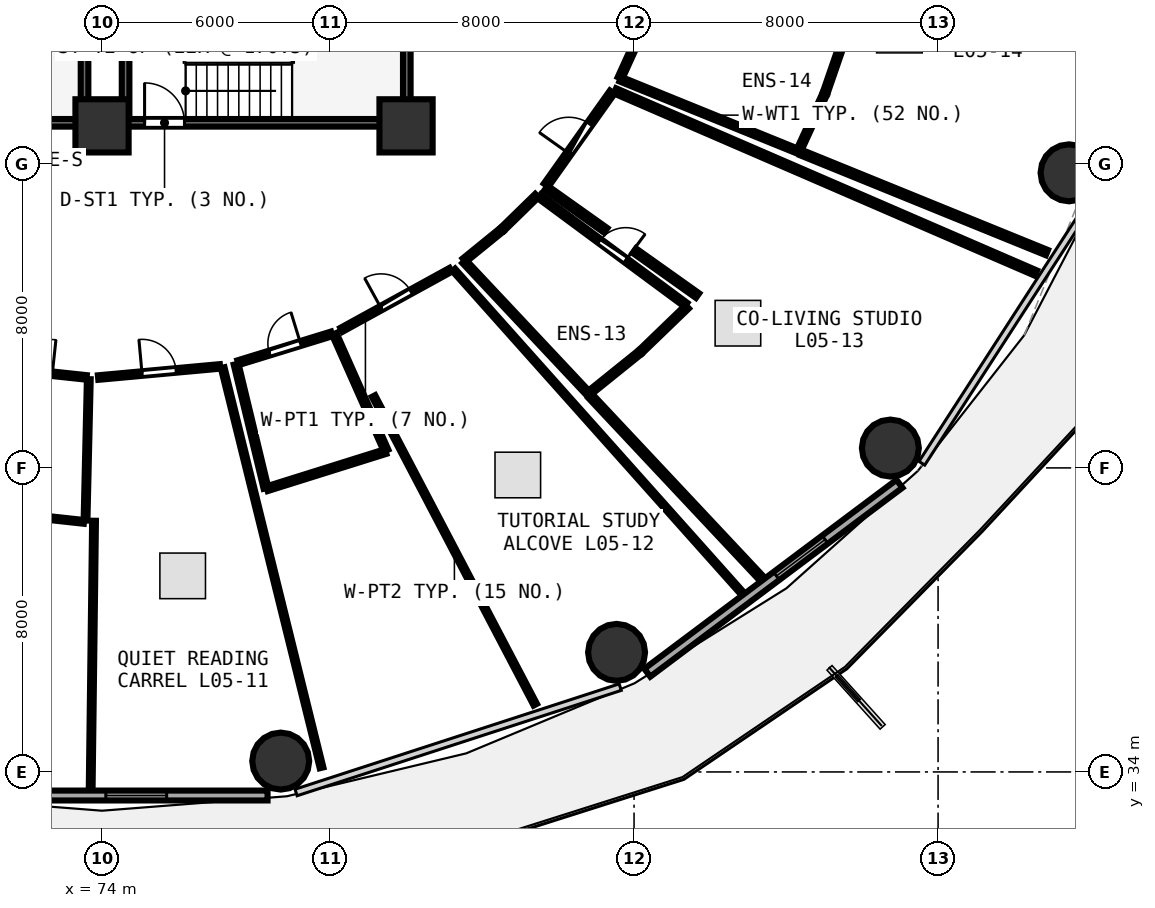
"""IFC4 building model, lengths in metres.
Left out: names, types, materials, properties, quantities, classifications, styles, units other than length and angle.
Written with IfcOpenShell. Run it as: python <this file> out.ifc"""

import sys

from ifc_helpers import new_model, si_unit, direction, frame, frame_2d, origin, origin_2d, place, context, subcontext, project, spatial, rectangle, circle, extrude, element, fill, save


model = new_model("IFC4")
c1 = context("Model", 3, precision=1e-05, world=origin(), true_north=direction((0.0, 1.0)))
c2 = subcontext(c1, "Body", "Model", "MODEL_VIEW")
j1 = project(units=[si_unit("LENGTHUNIT", "METRE"), si_unit("PLANEANGLEUNIT", "RADIAN")], contexts=[c1])
p1 = place(None, origin())
s1 = spatial("IfcSite", under=j1, at=p1, CompositionType="ELEMENT")
p2 = place(p1, origin())
s2 = spatial("IfcBuilding", under=s1, at=p2, CompositionType="ELEMENT")
p3 = place(p2, frame((0.0, 0.0, 22.5)))
s3 = spatial("IfcBuildingStorey", under=s2, at=p3, CompositionType="ELEMENT", Elevation=22.5)
for number, where, z_axis, x_axis in (
    (1, (74.0, 51.0, 0.0), (0.0, 0.0, 1.0), (1.0, 0.0, 0.0)),
    (2, (82.0, 51.0, 0.0), (0.0, 0.0, 1.0), (1.0, 0.0, 0.0)),
):
    element("IfcColumn", number, at=place(p3, frame(where, z_axis=z_axis, x_axis=x_axis)), inside=s3, PredefinedType="PILASTER", context=c2, shape_type="SweptSolid", body=[
        extrude(rectangle(XDim=1.4, YDim=1.4, at=origin_2d()), origin(), (0.0, 0.0, 1.0), 3.75),
    ])
for number, where, z_axis, x_axis in (
    (3, (78.702, 34.286, 0.0), (0.0, 0.0, 1.0), (1.0, 0.0, 0.0)),
    (4, (87.54, 37.146, 0.0), (0.0, 0.0, 1.0), (1.0, 0.0, 0.0)),
    (5, (94.744, 42.522, 0.0), (0.0, 0.0, 1.0), (1.0, 0.0, 0.0)),
    (6, (99.447, 49.764, 0.0), (0.0, 0.0, 1.0), (1.0, 0.0, 0.0)),
):
    element("IfcColumn", number, at=place(p3, frame(where, z_axis=z_axis, x_axis=x_axis)), inside=s3, PredefinedType="COLUMN", context=c2, shape_type="SweptSolid", body=[
        extrude(circle(Radius=0.75, at=origin_2d()), origin(), (0.0, 0.0, 1.0), 3.75),
    ])
p4 = place(p3, frame((69.644, 33.38, 0.0), z_axis=(0.0, 0.0, 1.0), x_axis=(1.0, 0.0, 0.0)))
e7 = element("IfcWall", 7, at=p4, inside=s3, PredefinedType="SOLIDWALL", context=c2, shape_type="SweptSolid", body=[
    extrude(rectangle(XDim=8.712, YDim=0.26, at=frame_2d((4.356, 0.0))), origin(), (0.0, 0.0, 1.0), 3.475),
])
p5 = place(p4, frame((4.456, 0.0, 0.85)))
e8 = element("IfcOpeningElement", 8, at=p5, cuts=e7, PredefinedType="OPENING", context=c2, shape_type="SweptSolid", body=[
    extrude(rectangle(XDim=1.6, YDim=1.45, at=frame_2d((0.8, 0.725))), frame((0.0, 0.14, 0.0), z_axis=(0.0, -1.0, 0.0), x_axis=(1.0, 0.0, 0.0)), (0.0, 0.0, 1.0), 0.28),
])
p6 = place(p3, frame((88.349, 36.611, 0.0), z_axis=(0.0, 0.0, 1.0), x_axis=(0.80030733173, 0.599590005569, 0.0)))
e9 = element("IfcWall", 9, at=p6, inside=s3, PredefinedType="SOLIDWALL", context=c2, shape_type="SweptSolid", body=[
    extrude(rectangle(XDim=8.291, YDim=0.26, at=frame_2d((4.145, 0.0))), origin(), (0.0, 0.0, 1.0), 3.475),
])
p7 = place(p6, frame((4.245, 0.0, 0.85)))
e10 = element("IfcOpeningElement", 10, at=p7, cuts=e9, PredefinedType="OPENING", context=c2, shape_type="SweptSolid", body=[
    extrude(rectangle(XDim=1.6, YDim=1.45, at=frame_2d((0.8, 0.725))), frame((0.0, 0.14, 0.0), z_axis=(0.0, -1.0, 0.0), x_axis=(1.0, 0.0, 0.0)), (0.0, 0.0, 1.0), 0.28),
])
p8 = place(p3, frame((74.0, 51.08, 0.0), z_axis=(0.0, 0.0, 1.0), x_axis=(1.0, 0.0, 0.0)))
e11 = element("IfcWall", 11, at=p8, inside=s3, PredefinedType="SHEAR", context=c2, shape_type="SweptSolid", body=[
    extrude(rectangle(XDim=7.9, YDim=0.2, at=frame_2d((3.95, 0.0))), origin(), (0.0, 0.0, 1.0), 3.49),
])
p9 = place(p8, frame((1.12, 0.0, 0.0)))
e12 = element("IfcOpeningElement", 12, at=p9, cuts=e11, PredefinedType="OPENING", context=c2, shape_type="SweptSolid", body=[
    extrude(rectangle(XDim=1.05, YDim=2.1, at=frame_2d((0.525, 1.05))), frame((0.0, 0.11, 0.0), z_axis=(0.0, -1.0, 0.0), x_axis=(1.0, 0.0, 0.0)), (0.0, 0.0, 1.0), 0.22),
])
for number, where, z_axis, x_axis in (
    (13, (82.02, 51.2, 0.0), (0.0, 0.0, 1.0), (0.0, 1.0, 0.0)),
    (14, (74.62, 54.27, 0.0), (0.0, 0.0, 1.0), (0.0, -1.0, 0.0)),
):
    element("IfcWall", number, at=place(p3, frame(where, z_axis=z_axis, x_axis=x_axis)), inside=s3, PredefinedType="SHEAR", context=c2, shape_type="SweptSolid", body=[
        extrude(rectangle(XDim=3.07, YDim=0.2, at=frame_2d((1.535, 0.0))), origin(), (0.0, 0.0, 1.0), 3.49),
    ])
p10 = place(p3, frame((66.26, 51.08, 0.0), z_axis=(0.0, 0.0, 1.0), x_axis=(1.0, 0.0, 0.0)))
e15 = element("IfcWall", 15, at=p10, inside=s3, PredefinedType="SHEAR", context=c2, shape_type="SweptSolid", body=[
    extrude(rectangle(XDim=7.16, YDim=0.2, at=frame_2d((3.58, 0.0))), origin(), (0.0, 0.0, 1.0), 3.49),
])
p11 = place(p3, frame((73.54, 51.2, 0.0), z_axis=(0.0, 0.0, 1.0), x_axis=(0.0, 1.0, 0.0)))
e16 = element("IfcWall", 16, at=p11, inside=s3, PredefinedType="SHEAR", context=c2, shape_type="SweptSolid", body=[
    extrude(rectangle(XDim=3.07, YDim=0.2, at=frame_2d((1.535, 0.0))), origin(), (0.0, 0.0, 1.0), 3.49),
])
p12 = place(p3, frame((70.895, 44.67, 0.0), z_axis=(0.0, 0.0, 1.0), x_axis=(0.994302004983, -0.106599825921, 0.0)))
e17 = element("IfcWall", 17, at=p12, inside=s3, PredefinedType="PARTITIONING", context=c2, shape_type="SweptSolid", body=[
    extrude(rectangle(XDim=2.714, YDim=0.12, at=frame_2d((1.357, 0.0))), origin(), (0.0, 0.0, 1.0), 3.235),
])
p13 = place(p12, frame((0.907, 0.0, 0.0)))
e18 = element("IfcOpeningElement", 18, at=p13, cuts=e17, PredefinedType="OPENING", context=c2, shape_type="SweptSolid", body=[
    extrude(rectangle(XDim=0.9, YDim=2.08, at=frame_2d((0.45, 1.04))), frame((0.0, 0.07, 0.0), z_axis=(0.0, -1.0, 0.0), x_axis=(1.0, 0.0, 0.0)), (0.0, 0.0, 1.0), 0.14),
])
p14 = place(p3, frame((73.897, 44.376, 0.0), z_axis=(0.0, 0.0, 1.0), x_axis=(0.995829610124, 0.091232601628, 0.0)))
e19 = element("IfcWall", 19, at=p14, inside=s3, PredefinedType="PARTITIONING", context=c2, shape_type="SweptSolid", body=[
    extrude(rectangle(XDim=3.222, YDim=0.12, at=frame_2d((1.611, 0.0))), origin(), (0.0, 0.0, 1.0), 3.235),
])
p15 = place(p14, frame((1.161, 0.0, 0.0)))
e20 = element("IfcOpeningElement", 20, at=p15, cuts=e19, PredefinedType="OPENING", context=c2, shape_type="SweptSolid", body=[
    extrude(rectangle(XDim=0.9, YDim=2.08, at=frame_2d((0.45, 1.04))), frame((0.0, 0.07, 0.0), z_axis=(0.0, -1.0, 0.0), x_axis=(1.0, 0.0, 0.0)), (0.0, 0.0, 1.0), 0.14),
])
p16 = place(p3, frame((77.58, 44.768, 0.0), z_axis=(0.0, 0.0, 1.0), x_axis=(0.955754448098, 0.294165659011, 0.0)))
e21 = element("IfcWall", 21, at=p16, inside=s3, PredefinedType="PLUMBINGWALL", context=c2, shape_type="SweptSolid", body=[
    extrude(rectangle(XDim=2.579, YDim=0.13, at=frame_2d((1.29, 0.0))), origin(), (0.0, 0.0, 1.0), 3.235),
])
p17 = place(p16, frame((0.86, 0.0, 0.0)))
e22 = element("IfcOpeningElement", 22, at=p17, cuts=e21, PredefinedType="OPENING", context=c2, shape_type="SweptSolid", body=[
    extrude(rectangle(XDim=0.86, YDim=2.05, at=frame_2d((0.43, 1.025))), frame((0.0, 0.075, 0.0), z_axis=(0.0, -1.0, 0.0), x_axis=(1.0, 0.0, 0.0)), (0.0, 0.0, 1.0), 0.15),
])
p18 = place(p3, frame((80.299, 45.632, 0.0), z_axis=(0.0, 0.0, 1.0), x_axis=(0.876387079092, 0.481607399861, 0.0)))
e23 = element("IfcWall", 23, at=p18, inside=s3, PredefinedType="PARTITIONING", context=c2, shape_type="SweptSolid", body=[
    extrude(rectangle(XDim=3.281, YDim=0.12, at=frame_2d((1.641, 0.0))), origin(), (0.0, 0.0, 1.0), 2.875),
])
p19 = place(p18, frame((1.191, 0.0, 0.0)))
e24 = element("IfcOpeningElement", 24, at=p19, cuts=e23, PredefinedType="OPENING", context=c2, shape_type="SweptSolid", body=[
    extrude(rectangle(XDim=0.9, YDim=2.08, at=frame_2d((0.45, 1.04))), frame((0.0, 0.07, 0.0), z_axis=(0.0, -1.0, 0.0), x_axis=(1.0, 0.0, 0.0)), (0.0, 0.0, 1.0), 0.14),
])
p20 = place(p3, frame((85.506, 49.143, 0.0), z_axis=(0.0, 0.0, 1.0), x_axis=(0.80412644244, -0.594458295063, 0.0)))
e25 = element("IfcWall", 25, at=p20, inside=s3, PredefinedType="PLUMBINGWALL", context=c2, shape_type="SweptSolid", body=[
    extrude(rectangle(XDim=4.799, YDim=0.13, at=frame_2d((2.399, 0.0))), origin(), (0.0, 0.0, 1.0), 2.875),
])
p21 = place(p20, frame((1.969, 0.0, 0.0)))
e26 = element("IfcOpeningElement", 26, at=p21, cuts=e25, PredefinedType="OPENING", context=c2, shape_type="SweptSolid", body=[
    extrude(rectangle(XDim=0.86, YDim=2.05, at=frame_2d((0.43, 1.025))), frame((0.0, 0.075, 0.0), z_axis=(0.0, -1.0, 0.0), x_axis=(1.0, 0.0, 0.0)), (0.0, 0.0, 1.0), 0.15),
])
p22 = place(p3, frame((85.686, 49.438, 0.0), z_axis=(0.0, 0.0, 1.0), x_axis=(0.579107689823, 0.815251055557, 0.0)))
e27 = element("IfcWall", 27, at=p22, inside=s3, PredefinedType="PARTITIONING", context=c2, shape_type="SweptSolid", body=[
    extrude(rectangle(XDim=3.005, YDim=0.15, at=frame_2d((1.503, 0.0))), origin(), (0.0, 0.0, 1.0), 2.875),
])
p23 = place(p22, frame((1.028, 0.0, 0.0)))
e28 = element("IfcOpeningElement", 28, at=p23, cuts=e27, PredefinedType="OPENING", context=c2, shape_type="SweptSolid", body=[
    extrude(rectangle(XDim=0.95, YDim=2.08, at=frame_2d((0.475, 1.04))), frame((0.0, 0.085, 0.0), z_axis=(0.0, -1.0, 0.0), x_axis=(1.0, 0.0, 0.0)), (0.0, 0.0, 1.0), 0.17),
])
p24 = place(p3, frame((73.652, 44.334, 0.0), z_axis=(0.0, 0.0, 1.0), x_axis=(-0.02316715399, -0.99973160547, 0.0)))
e29 = element("IfcWall", 29, at=p24, inside=s3, PredefinedType="PARTITIONING", context=c2, shape_type="SweptSolid", body=[
    extrude(rectangle(XDim=3.72, YDim=0.1, at=frame_2d((1.86, 0.0))), origin(), (0.0, 0.0, 1.0), 3.175),
])
p25 = place(p3, frame((73.525, 40.579, 0.0), z_axis=(0.0, 0.0, 1.0), x_axis=(-0.994070147468, 0.108740709544, 0.0)))
e30 = element("IfcWall", 30, at=p25, inside=s3, PredefinedType="PARTITIONING", context=c2, shape_type="SweptSolid", body=[
    extrude(rectangle(XDim=3.471, YDim=0.1, at=frame_2d((1.735, 0.0))), origin(), (0.0, 0.0, 1.0), 3.175),
])
p26 = place(p3, frame((77.175, 44.637, 0.0), z_axis=(0.0, 0.0, 1.0), x_axis=(0.239971369295, -0.970779965759, 0.0)))
e31 = element("IfcWall", 31, at=p26, inside=s3, PredefinedType="PARTITIONING", context=c2, shape_type="SweptSolid", body=[
    extrude(rectangle(XDim=10.846, YDim=0.1, at=frame_2d((5.423, 0.0))), origin(), (0.0, 0.0, 1.0), 2.875),
])
p27 = place(p3, frame((73.701, 33.561, 0.0), z_axis=(0.0, 0.0, 1.0), x_axis=(0.012537113793, 0.9999214073, 0.0)))
e32 = element("IfcWall", 32, at=p27, inside=s3, PredefinedType="PARTITIONING", context=c2, shape_type="SweptSolid", body=[
    extrude(rectangle(XDim=7.049, YDim=0.1, at=frame_2d((3.525, 0.0))), origin(), (0.0, 0.0, 1.0), 2.875),
])
p28 = place(p3, frame((80.111, 45.526, 0.0), z_axis=(0.0, 0.0, 1.0), x_axis=(0.405936178007, -0.913901427608, 0.0)))
e33 = element("IfcWall", 33, at=p28, inside=s3, PredefinedType="PLUMBINGWALL", context=c2, shape_type="SweptSolid", body=[
    extrude(rectangle(XDim=3.36, YDim=0.13, at=frame_2d((1.68, 0.0))), origin(), (0.0, 0.0, 1.0), 2.875),
])
p29 = place(p3, frame((81.464, 42.431, 0.0), z_axis=(0.0, 0.0, 1.0), x_axis=(-0.954175708416, -0.299246917226, 0.0)))
e34 = element("IfcWall", 34, at=p29, inside=s3, PredefinedType="PLUMBINGWALL", context=c2, shape_type="SweptSolid", body=[
    extrude(rectangle(XDim=3.275, YDim=0.13, at=frame_2d((1.637, 0.0))), origin(), (0.0, 0.0, 1.0), 2.875),
])
p30 = place(p3, frame((78.315, 41.464, 0.0), z_axis=(0.0, 0.0, 1.0), x_axis=(-0.234406131581, 0.972138758345, 0.0)))
e35 = element("IfcWall", 35, at=p30, inside=s3, PredefinedType="PLUMBINGWALL", context=c2, shape_type="SweptSolid", body=[
    extrude(rectangle(XDim=3.36, YDim=0.13, at=frame_2d((1.68, 0.0))), origin(), (0.0, 0.0, 1.0), 3.235),
])
p31 = place(p3, frame((83.254, 47.211, 0.0), z_axis=(0.0, 0.0, 1.0), x_axis=(0.66580890104, -0.746122313897, 0.0)))
e36 = element("IfcWall", 36, at=p31, inside=s3, PredefinedType="PARTITIONING", context=c2, shape_type="SweptSolid", body=[
    extrude(rectangle(XDim=11.399, YDim=0.1, at=frame_2d((5.7, 0.0))), origin(), (0.0, 0.0, 1.0), 2.875),
])
p32 = place(p3, frame((85.401, 35.769, 0.0), z_axis=(0.0, 0.0, 1.0), x_axis=(-0.464308397246, 0.885673592384, 0.0)))
e37 = element("IfcWall", 37, at=p32, inside=s3, PredefinedType="PARTITIONING", context=c2, shape_type="SweptSolid", body=[
    extrude(rectangle(XDim=9.17, YDim=0.1, at=frame_2d((4.585, 0.0))), origin(), (0.0, 0.0, 1.0), 2.875),
])
p33 = place(p3, frame((83.53, 47.461, 0.0), z_axis=(0.0, 0.0, 1.0), x_axis=(0.77596084644, 0.63078107517, 0.0)))
e38 = element("IfcWall", 38, at=p33, inside=s3, PredefinedType="PLUMBINGWALL", context=c2, shape_type="SweptSolid", body=[
    extrude(rectangle(XDim=1.268, YDim=0.13, at=frame_2d((0.634, 0.0))), origin(), (0.0, 0.0, 1.0), 2.875),
])
p34 = place(p3, frame((84.543, 48.287, 0.0), z_axis=(0.0, 0.0, 1.0), x_axis=(0.715980731769, 0.698120041064, 0.0)))
e39 = element("IfcWall", 39, at=p34, inside=s3, PredefinedType="PLUMBINGWALL", context=c2, shape_type="SweptSolid", body=[
    extrude(rectangle(XDim=1.258, YDim=0.13, at=frame_2d((0.629, 0.0))), origin(), (0.0, 0.0, 1.0), 2.875),
])
p35 = place(p3, frame((89.399, 46.241, 0.0), z_axis=(0.0, 0.0, 1.0), x_axis=(-0.719664402118, -0.694322078234, 0.0)))
e40 = element("IfcWall", 40, at=p35, inside=s3, PredefinedType="PLUMBINGWALL", context=c2, shape_type="SweptSolid", body=[
    extrude(rectangle(XDim=1.696, YDim=0.13, at=frame_2d((0.848, 0.0))), origin(), (0.0, 0.0, 1.0), 2.875),
])
p36 = place(p3, frame((88.148, 45.038, 0.0), z_axis=(0.0, 0.0, 1.0), x_axis=(-0.778806140639, -0.627264693174, 0.0)))
e41 = element("IfcWall", 41, at=p36, inside=s3, PredefinedType="PLUMBINGWALL", context=c2, shape_type="SweptSolid", body=[
    extrude(rectangle(XDim=1.713, YDim=0.13, at=frame_2d((0.856, 0.0))), origin(), (0.0, 0.0, 1.0), 3.175),
])
p37 = place(p3, frame((86.785, 43.966, 0.0), z_axis=(0.0, 0.0, 1.0), x_axis=(-0.68469858897, 0.728826345753, 0.0)))
e42 = element("IfcWall", 42, at=p37, inside=s3, PredefinedType="PLUMBINGWALL", context=c2, shape_type="SweptSolid", body=[
    extrude(rectangle(XDim=4.758, YDim=0.13, at=frame_2d((2.379, 0.0))), origin(), (0.0, 0.0, 1.0), 2.875),
])
p38 = place(p3, frame((87.498, 51.921, 0.0), z_axis=(0.0, 0.0, 1.0), x_axis=(0.917695041134, -0.397285554077, 0.0)))
e43 = element("IfcWall", 43, at=p38, inside=s3, PredefinedType="PARTITIONING", context=c2, shape_type="SweptSolid", body=[
    extrude(rectangle(XDim=12.07, YDim=0.15, at=frame_2d((6.035, 0.0))), origin(), (0.0, 0.0, 1.0), 2.875),
])
p39 = place(p3, frame((91.368, 39.078, 0.0), z_axis=(0.0, 0.0, 1.0), x_axis=(-0.684296653493, 0.729203736975, 0.0)))
e44 = element("IfcWall", 44, at=p39, inside=s3, PredefinedType="PARTITIONING", context=c2, shape_type="SweptSolid", body=[
    extrude(rectangle(XDim=6.6, YDim=0.15, at=frame_2d((3.3, 0.0))), origin(), (0.0, 0.0, 1.0), 2.875),
])
p40 = place(p3, frame((89.671, 46.533, 0.0), z_axis=(0.0, 0.0, 1.0), x_axis=(-0.815281399299, 0.579064970411, 0.0)))
e45 = element("IfcWall", 45, at=p40, inside=s3, PredefinedType="PARTITIONING", context=c2, shape_type="SweptSolid", body=[
    extrude(rectangle(XDim=2.042, YDim=0.15, at=frame_2d((1.021, 0.0))), origin(), (0.0, 0.0, 1.0), 3.48),
])
p41 = place(p3, frame((87.256, 48.249, 0.0), z_axis=(0.0, 0.0, 1.0), x_axis=(-0.815270043711, 0.579080957922, 0.0)))
e46 = element("IfcWall", 46, at=p41, inside=s3, PredefinedType="PARTITIONING", context=c2, shape_type="SweptSolid", body=[
    extrude(rectangle(XDim=1.929, YDim=0.15, at=frame_2d((0.964, 0.0))), origin(), (0.0, 0.0, 1.0), 3.235),
])
p42 = place(p3, frame((87.628, 52.255, 0.0), z_axis=(0.0, 0.0, 1.0), x_axis=(0.4138937247, 0.910325208183, 0.0)))
e47 = element("IfcWall", 47, at=p42, inside=s3, PredefinedType="PLUMBINGWALL", context=c2, shape_type="SweptSolid", body=[
    extrude(rectangle(XDim=1.216, YDim=0.13, at=frame_2d((0.608, 0.0))), origin(), (0.0, 0.0, 1.0), 3.48),
])
p43 = place(p3, frame((93.559, 53.402, 0.0), z_axis=(0.0, 0.0, 1.0), x_axis=(-0.326356647952, -0.945246707657, 0.0)))
e48 = element("IfcWall", 48, at=p43, inside=s3, PredefinedType="PLUMBINGWALL", context=c2, shape_type="SweptSolid", body=[
    extrude(rectangle(XDim=1.624, YDim=0.13, at=frame_2d((0.812, 0.0))), origin(), (0.0, 0.0, 1.0), 3.48),
])
p44 = place(p3, frame((93.014, 51.83, 0.0), z_axis=(0.0, 0.0, 1.0), x_axis=(-0.41762687648, -0.908618617486, 0.0)))
e49 = element("IfcWall", 49, at=p44, inside=s3, PredefinedType="PLUMBINGWALL", context=c2, shape_type="SweptSolid", body=[
    extrude(rectangle(XDim=1.634, YDim=0.13, at=frame_2d((0.817, 0.0))), origin(), (0.0, 0.0, 1.0), 2.875),
])
p45 = place(p3, frame((92.304, 50.334, 0.0), z_axis=(0.0, 0.0, 1.0), x_axis=(-0.926504606816, 0.376283421835, 0.0)))
e50 = element("IfcWall", 50, at=p45, inside=s3, PredefinedType="PLUMBINGWALL", context=c2, shape_type="SweptSolid", body=[
    extrude(rectangle(XDim=5.036, YDim=0.13, at=frame_2d((2.518, 0.0))), origin(), (0.0, 0.0, 1.0), 2.875),
])
p46 = place(p3, frame((98.865, 47.664, 0.0), z_axis=(0.0, 0.0, 1.0), x_axis=(-0.926325178802, 0.376724917038, 0.0)))
e51 = element("IfcWall", 51, at=p46, inside=s3, PredefinedType="PARTITIONING", context=c2, shape_type="SweptSolid", body=[
    extrude(rectangle(XDim=6.983, YDim=0.15, at=frame_2d((3.492, 0.0))), origin(), (0.0, 0.0, 1.0), 2.875),
])
p47 = place(p5, origin())
e52 = element("IfcWindow", 52, at=p47, inside=s3, PartitioningType="SINGLE_PANEL", PredefinedType="WINDOW", context=c2, shape_type="SweptSolid", body=[
    extrude(rectangle(XDim=1.6, YDim=1.45, at=frame_2d((0.8, 0.725))), frame((0.0, 0.03, 0.0), z_axis=(0.0, -1.0, 0.0), x_axis=(1.0, 0.0, 0.0)), (0.0, 0.0, 1.0), 0.06),
])
fill(e8, e52)
p48 = place(p7, origin())
e53 = element("IfcWindow", 53, at=p48, inside=s3, PartitioningType="SINGLE_PANEL", PredefinedType="WINDOW", context=c2, shape_type="SweptSolid", body=[
    extrude(rectangle(XDim=1.6, YDim=1.45, at=frame_2d((0.8, 0.725))), frame((0.0, 0.03, 0.0), z_axis=(0.0, -1.0, 0.0), x_axis=(1.0, 0.0, 0.0)), (0.0, 0.0, 1.0), 0.06),
])
fill(e10, e53)
p49 = place(p9, origin())
e54 = element("IfcDoor", 54, at=p49, inside=s3, OperationType="SINGLE_SWING_LEFT", PredefinedType="DOOR", context=c2, shape_type="SweptSolid", body=[
    extrude(rectangle(XDim=1.05, YDim=2.1, at=frame_2d((0.525, 1.05))), frame((0.0, 0.025, 0.0), z_axis=(0.0, -1.0, 0.0), x_axis=(1.0, 0.0, 0.0)), (0.0, 0.0, 1.0), 0.05),
])
fill(e12, e54)
p50 = place(p15, origin())
e55 = element("IfcDoor", 55, at=p50, inside=s3, OperationType="SINGLE_SWING_LEFT", PredefinedType="DOOR", context=c2, shape_type="SweptSolid", body=[
    extrude(rectangle(XDim=0.9, YDim=2.08, at=frame_2d((0.45, 1.04))), frame((0.0, 0.025, 0.0), z_axis=(0.0, -1.0, 0.0), x_axis=(1.0, 0.0, 0.0)), (0.0, 0.0, 1.0), 0.05),
])
fill(e20, e55)
p51 = place(p17, origin())
e56 = element("IfcDoor", 56, at=p51, inside=s3, OperationType="SINGLE_SWING_RIGHT", PredefinedType="DOOR", context=c2, shape_type="SweptSolid", body=[
    extrude(rectangle(XDim=0.86, YDim=2.05, at=frame_2d((0.43, 1.025))), frame((0.0, 0.025, 0.0), z_axis=(0.0, -1.0, 0.0), x_axis=(1.0, 0.0, 0.0)), (0.0, 0.0, 1.0), 0.05),
])
fill(e22, e56)
p52 = place(p19, origin())
e57 = element("IfcDoor", 57, at=p52, inside=s3, OperationType="SINGLE_SWING_LEFT", PredefinedType="DOOR", context=c2, shape_type="SweptSolid", body=[
    extrude(rectangle(XDim=0.9, YDim=2.08, at=frame_2d((0.45, 1.04))), frame((0.0, 0.025, 0.0), z_axis=(0.0, -1.0, 0.0), x_axis=(1.0, 0.0, 0.0)), (0.0, 0.0, 1.0), 0.05),
])
fill(e24, e57)
p53 = place(p21, origin())
e58 = element("IfcDoor", 58, at=p53, inside=s3, OperationType="SINGLE_SWING_RIGHT", PredefinedType="DOOR", context=c2, shape_type="SweptSolid", body=[
    extrude(rectangle(XDim=0.86, YDim=2.05, at=frame_2d((0.43, 1.025))), frame((0.0, 0.025, 0.0), z_axis=(0.0, -1.0, 0.0), x_axis=(1.0, 0.0, 0.0)), (0.0, 0.0, 1.0), 0.05),
])
fill(e26, e58)
p54 = place(p23, origin())
e59 = element("IfcDoor", 59, at=p54, inside=s3, OperationType="SINGLE_SWING_LEFT", PredefinedType="DOOR", context=c2, shape_type="SweptSolid", body=[
    extrude(rectangle(XDim=0.95, YDim=2.08, at=frame_2d((0.475, 1.04))), frame((0.0, 0.025, 0.0), z_axis=(0.0, -1.0, 0.0), x_axis=(1.0, 0.0, 0.0)), (0.0, 0.0, 1.0), 0.05),
])
fill(e28, e59)
save(model, sys.argv[1])
